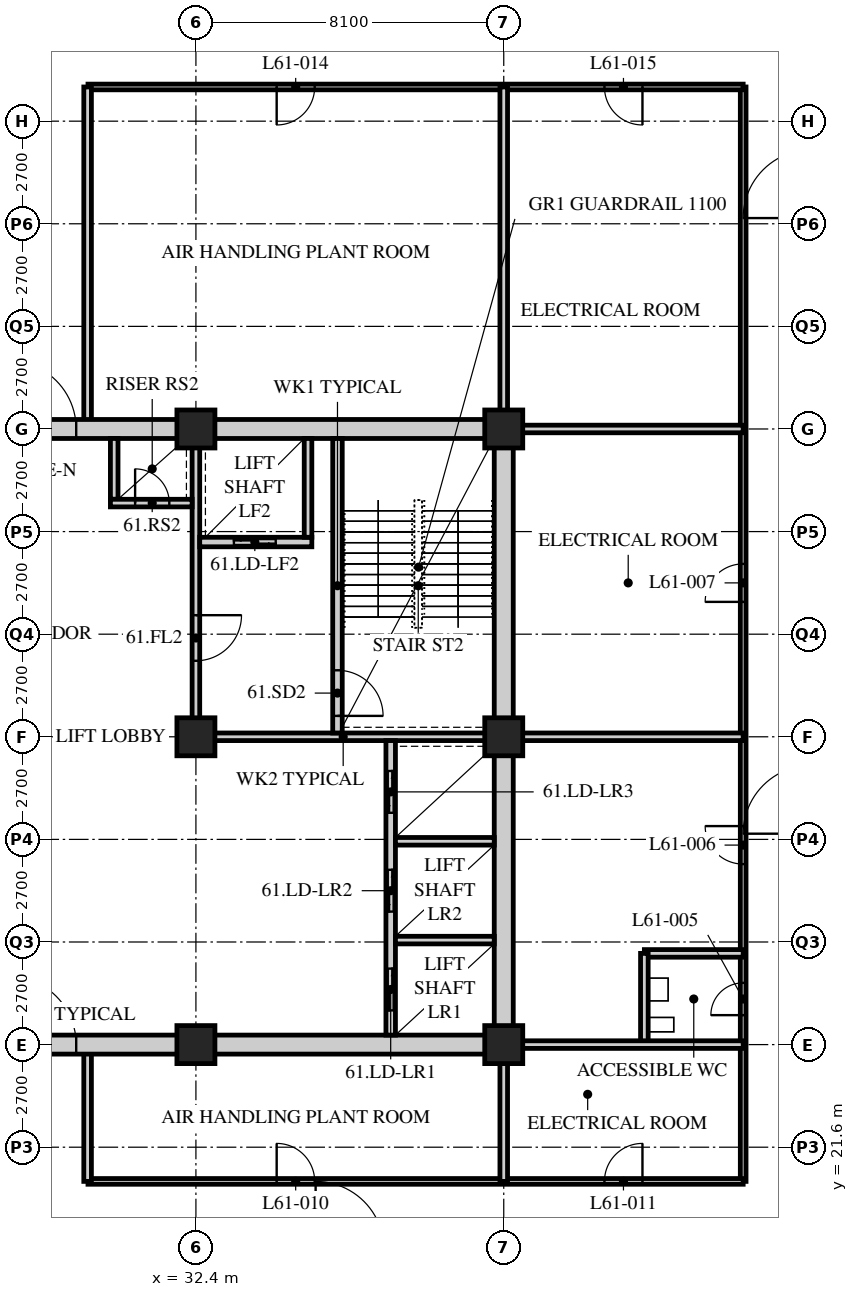
"""IFC4 building model, lengths in metres.
Left out: names, types, materials, properties, quantities, classifications, styles, units other than length and angle.
Written with IfcOpenShell. Run it as: python <this file> out.ifc"""

import sys

from ifc_helpers import new_model, si_unit, direction, frame, frame_2d, origin, origin_2d, place, context, subcontext, project, spatial, rectangle, hollow_rectangle, extrude, element, fill, save


model = new_model("IFC4")
c1 = context("Model", 3, precision=1e-05, world=origin(), true_north=direction((0.0, 1.0)))
c2 = subcontext(c1, "Body", "Model", "MODEL_VIEW")
j1 = project(units=[si_unit("LENGTHUNIT", "METRE"), si_unit("PLANEANGLEUNIT", "RADIAN")], contexts=[c1])
p1 = place(None, origin())
s1 = spatial("IfcSite", under=j1, at=p1, CompositionType="ELEMENT")
p2 = place(p1, origin())
s2 = spatial("IfcBuilding", under=s1, at=p2, CompositionType="ELEMENT")
p3 = place(p2, frame((0.0, 0.0, 235.2)))
s3 = spatial("IfcBuildingStorey", under=s2, at=p3, CompositionType="ELEMENT", Elevation=235.2)
for number, where, z_axis, x_axis in (
    (1, (32.4, 24.3, 0.0), (0.0, 0.0, 1.0), (1.0, 0.0, 0.0)),
    (2, (32.4, 32.4, 0.0), (0.0, 0.0, 1.0), (1.0, 0.0, 0.0)),
    (3, (32.4, 40.5, 0.0), (0.0, 0.0, 1.0), (1.0, 0.0, 0.0)),
    (4, (40.5, 24.3, 0.0), (0.0, 0.0, 1.0), (1.0, 0.0, 0.0)),
    (5, (40.5, 32.4, 0.0), (0.0, 0.0, 1.0), (1.0, 0.0, 0.0)),
    (6, (40.5, 40.5, 0.0), (0.0, 0.0, 1.0), (1.0, 0.0, 0.0)),
):
    element("IfcColumn", number, at=place(p3, frame(where, z_axis=z_axis, x_axis=x_axis)), inside=s3, PredefinedType="COLUMN", context=c2, shape_type="SweptSolid", body=[
        extrude(hollow_rectangle(XDim=1.0, YDim=1.0, WallThickness=0.1, at=origin_2d()), origin(), (0.0, 0.0, 1.0), 7.2),
    ])
p4 = place(p3, frame((46.8, 20.7, 0.0), z_axis=(0.0, 0.0, 1.0), x_axis=(0.0, 1.0, 0.0)))
e7 = element("IfcWall", 7, at=p4, inside=s3, PredefinedType="PARTITIONING", context=c2, shape_type="SweptSolid", body=[
    extrude(rectangle(XDim=28.8, YDim=0.15, at=frame_2d((14.4, 0.0))), origin(), (0.0, 0.0, 1.0), 6.95),
])
p5 = place(p4, frame((4.375, 0.0, 0.0)))
e8 = element("IfcOpeningElement", 8, at=p5, cuts=e7, PredefinedType="OPENING", context=c2, shape_type="SweptSolid", body=[
    extrude(rectangle(XDim=0.85, YDim=2.1, at=frame_2d((0.425, 1.05))), frame((0.0, 0.085, 0.0), z_axis=(0.0, -1.0, 0.0), x_axis=(1.0, 0.0, 0.0)), (0.0, 0.0, 1.0), 0.17),
])
p6 = place(p4, frame((8.35, 0.0, 0.0)))
e9 = element("IfcOpeningElement", 9, at=p6, cuts=e7, PredefinedType="OPENING", context=c2, shape_type="SweptSolid", body=[
    extrude(rectangle(XDim=1.0, YDim=2.1, at=frame_2d((0.5, 1.05))), frame((0.0, 0.085, 0.0), z_axis=(0.0, -1.0, 0.0), x_axis=(1.0, 0.0, 0.0)), (0.0, 0.0, 1.0), 0.17),
])
p7 = place(p4, frame((15.25, 0.0, 0.0)))
e10 = element("IfcOpeningElement", 10, at=p7, cuts=e7, PredefinedType="OPENING", context=c2, shape_type="SweptSolid", body=[
    extrude(rectangle(XDim=1.0, YDim=2.1, at=frame_2d((0.5, 1.05))), frame((0.0, 0.085, 0.0), z_axis=(0.0, -1.0, 0.0), x_axis=(1.0, 0.0, 0.0)), (0.0, 0.0, 1.0), 0.17),
])
p8 = place(p3, frame((46.8, 49.5, 0.0), z_axis=(0.0, 0.0, 1.0), x_axis=(-1.0, 0.0, 0.0)))
e11 = element("IfcWall", 11, at=p8, inside=s3, PredefinedType="PARTITIONING", context=c2, shape_type="SweptSolid", body=[
    extrude(rectangle(XDim=17.24, YDim=0.15, at=frame_2d((8.62, 0.0))), origin(), (0.0, 0.0, 1.0), 6.95),
])
p9 = place(p8, frame((11.275, 0.0, 0.0)))
e12 = element("IfcOpeningElement", 12, at=p9, cuts=e11, PredefinedType="OPENING", context=c2, shape_type="SweptSolid", body=[
    extrude(rectangle(XDim=1.0, YDim=2.1, at=frame_2d((0.5, 1.05))), frame((0.0, 0.085, 0.0), z_axis=(0.0, -1.0, 0.0), x_axis=(1.0, 0.0, 0.0)), (0.0, 0.0, 1.0), 0.17),
])
p10 = place(p8, frame((2.65, 0.0, 0.0)))
e13 = element("IfcOpeningElement", 13, at=p10, cuts=e11, PredefinedType="OPENING", context=c2, shape_type="SweptSolid", body=[
    extrude(rectangle(XDim=1.0, YDim=2.1, at=frame_2d((0.5, 1.05))), frame((0.0, 0.085, 0.0), z_axis=(0.0, -1.0, 0.0), x_axis=(1.0, 0.0, 0.0)), (0.0, 0.0, 1.0), 0.17),
])
p11 = place(p3, frame((29.56, 20.7, 0.0), z_axis=(0.0, 0.0, 1.0), x_axis=(1.0, 0.0, 0.0)))
e14 = element("IfcWall", 14, at=p11, inside=s3, PredefinedType="PARTITIONING", context=c2, shape_type="SweptSolid", body=[
    extrude(rectangle(XDim=17.24, YDim=0.15, at=frame_2d((8.62, 0.0))), origin(), (0.0, 0.0, 1.0), 6.95),
])
p12 = place(p11, frame((4.965, 0.0, 0.0)))
e15 = element("IfcOpeningElement", 15, at=p12, cuts=e14, PredefinedType="OPENING", context=c2, shape_type="SweptSolid", body=[
    extrude(rectangle(XDim=1.0, YDim=2.1, at=frame_2d((0.5, 1.05))), frame((0.0, 0.085, 0.0), z_axis=(0.0, -1.0, 0.0), x_axis=(1.0, 0.0, 0.0)), (0.0, 0.0, 1.0), 0.17),
])
p13 = place(p11, frame((13.59, 0.0, 0.0)))
e16 = element("IfcOpeningElement", 16, at=p13, cuts=e14, PredefinedType="OPENING", context=c2, shape_type="SweptSolid", body=[
    extrude(rectangle(XDim=1.0, YDim=2.1, at=frame_2d((0.5, 1.05))), frame((0.0, 0.085, 0.0), z_axis=(0.0, -1.0, 0.0), x_axis=(1.0, 0.0, 0.0)), (0.0, 0.0, 1.0), 0.17),
])
p14 = place(p3, frame((40.5, 32.4, 0.0), z_axis=(0.0, 0.0, 1.0), x_axis=(1.0, 0.0, 0.0)))
e17 = element("IfcWall", 17, at=p14, inside=s3, PredefinedType="SOLIDWALL", context=c2, shape_type="SweptSolid", body=[
    extrude(rectangle(XDim=6.3, YDim=0.2, at=frame_2d((3.15, 0.0))), origin(), (0.0, 0.0, 1.0), 6.25),
])
p15 = place(p3, frame((46.8, 26.7, 0.0), z_axis=(0.0, 0.0, 1.0), x_axis=(-1.0, 0.0, 0.0)))
e18 = element("IfcWall", 18, at=p15, inside=s3, PredefinedType="SOLIDWALL", context=c2, shape_type="SweptSolid", body=[
    extrude(rectangle(XDim=2.6, YDim=0.2, at=frame_2d((1.3, 0.0))), origin(), (0.0, 0.0, 1.0), 6.95),
])
p16 = place(p3, frame((44.2, 24.3, 0.0), z_axis=(0.0, 0.0, 1.0), x_axis=(0.0, 1.0, 0.0)))
e19 = element("IfcWall", 19, at=p16, inside=s3, PredefinedType="SOLIDWALL", context=c2, shape_type="SweptSolid", body=[
    extrude(rectangle(XDim=2.4, YDim=0.2, at=frame_2d((1.2, 0.0))), origin(), (0.0, 0.0, 1.0), 6.95),
])
p17 = place(p3, frame((40.5, 20.7, 0.0), z_axis=(0.0, 0.0, 1.0), x_axis=(0.0, 1.0, 0.0)))
e20 = element("IfcWall", 20, at=p17, inside=s3, PredefinedType="SOLIDWALL", context=c2, shape_type="SweptSolid", body=[
    extrude(rectangle(XDim=3.6, YDim=0.2, at=frame_2d((1.8, 0.0))), origin(), (0.0, 0.0, 1.0), 5.95),
])
p18 = place(p3, frame((29.55, 20.7, 0.0), z_axis=(0.0, 0.0, 1.0), x_axis=(0.0, 1.0, 0.0)))
e21 = element("IfcWall", 21, at=p18, inside=s3, PredefinedType="SOLIDWALL", context=c2, shape_type="SweptSolid", body=[
    extrude(rectangle(XDim=3.6, YDim=0.2, at=frame_2d((1.8, 0.0))), origin(), (0.0, 0.0, 1.0), 6.95),
])
p19 = place(p3, frame((40.5, 40.5, 0.0), z_axis=(0.0, 0.0, 1.0), x_axis=(0.0, 1.0, 0.0)))
e22 = element("IfcWall", 22, at=p19, inside=s3, PredefinedType="SOLIDWALL", context=c2, shape_type="SweptSolid", body=[
    extrude(rectangle(XDim=9.0, YDim=0.2, at=frame_2d((4.5, 0.0))), origin(), (0.0, 0.0, 1.0), 5.95),
])
p20 = place(p3, frame((29.55, 40.5, 0.0), z_axis=(0.0, 0.0, 1.0), x_axis=(0.0, 1.0, 0.0)))
e23 = element("IfcWall", 23, at=p20, inside=s3, PredefinedType="SOLIDWALL", context=c2, shape_type="SweptSolid", body=[
    extrude(rectangle(XDim=9.0, YDim=0.2, at=frame_2d((4.5, 0.0))), origin(), (0.0, 0.0, 1.0), 6.95),
])
for number, where, z_axis, x_axis in (
    (24, (40.5, 24.3, 0.0), (0.0, 0.0, 1.0), (1.0, 0.0, 0.0)),
    (25, (40.5, 40.5, 0.0), (0.0, 0.0, 1.0), (1.0, 0.0, 0.0)),
):
    element("IfcWall", number, at=place(p3, frame(where, z_axis=z_axis, x_axis=x_axis)), inside=s3, PredefinedType="SOLIDWALL", context=c2, shape_type="SweptSolid", body=[
        extrude(rectangle(XDim=6.3, YDim=0.2, at=frame_2d((3.15, 0.0))), origin(), (0.0, 0.0, 1.0), 6.25),
    ])
p21 = place(p3, frame((15.95, 24.3, 0.0), z_axis=(0.0, 0.0, 1.0), x_axis=(1.0, 0.0, 0.0)))
e26 = element("IfcWall", 26, at=p21, inside=s3, PredefinedType="SOLIDWALL", context=c2, shape_type="SweptSolid", body=[
    extrude(rectangle(XDim=24.8, YDim=0.5, at=frame_2d((12.4, 0.0))), origin(), (0.0, 0.0, 1.0), 6.188),
])
p22 = place(p21, frame((11.5, 0.0, 0.0)))
e27 = element("IfcOpeningElement", 27, at=p22, cuts=e26, PredefinedType="OPENING", context=c2, shape_type="SweptSolid", body=[
    extrude(rectangle(XDim=1.8, YDim=2.4, at=frame_2d((0.9, 1.2))), frame((0.0, 0.26, 0.0), z_axis=(0.0, -1.0, 0.0), x_axis=(1.0, 0.0, 0.0)), (0.0, 0.0, 1.0), 0.52),
])
p23 = place(p3, frame((15.95, 40.5, 0.0), z_axis=(0.0, 0.0, 1.0), x_axis=(1.0, 0.0, 0.0)))
e28 = element("IfcWall", 28, at=p23, inside=s3, PredefinedType="SOLIDWALL", context=c2, shape_type="SweptSolid", body=[
    extrude(rectangle(XDim=24.8, YDim=0.5, at=frame_2d((12.4, 0.0))), origin(), (0.0, 0.0, 1.0), 6.188),
])
p24 = place(p23, frame((11.5, 0.0, 0.0)))
e29 = element("IfcOpeningElement", 29, at=p24, cuts=e28, PredefinedType="OPENING", context=c2, shape_type="SweptSolid", body=[
    extrude(rectangle(XDim=1.8, YDim=2.4, at=frame_2d((0.9, 1.2))), frame((0.0, 0.26, 0.0), z_axis=(0.0, -1.0, 0.0), x_axis=(1.0, 0.0, 0.0)), (0.0, 0.0, 1.0), 0.52),
])
p25 = place(p3, frame((40.5, 24.55, 0.0), z_axis=(0.0, 0.0, 1.0), x_axis=(0.0, 1.0, 0.0)))
e30 = element("IfcWall", 30, at=p25, inside=s3, PredefinedType="SOLIDWALL", context=c2, shape_type="SweptSolid", body=[
    extrude(rectangle(XDim=15.7, YDim=0.5, at=frame_2d((7.85, 0.0))), origin(), (0.0, 0.0, 1.0), 5.95),
])
p26 = place(p3, frame((32.3, 32.4, 0.0), z_axis=(0.0, 0.0, 1.0), x_axis=(1.0, 0.0, 0.0)))
e31 = element("IfcWall", 31, at=p26, inside=s3, PredefinedType="SOLIDWALL", context=c2, shape_type="SweptSolid", body=[
    extrude(rectangle(XDim=7.95, YDim=0.2, at=frame_2d((3.975, 0.0))), origin(), (0.0, 0.0, 1.0), 6.25),
])
p27 = place(p3, frame((32.4, 32.5, 0.0), z_axis=(0.0, 0.0, 1.0), x_axis=(0.0, 1.0, 0.0)))
e32 = element("IfcWall", 32, at=p27, inside=s3, PredefinedType="SOLIDWALL", context=c2, shape_type="SweptSolid", body=[
    extrude(rectangle(XDim=7.75, YDim=0.2, at=frame_2d((3.875, 0.0))), origin(), (0.0, 0.0, 1.0), 6.25),
])
p28 = place(p27, frame((1.9, 0.0, 0.0)))
e33 = element("IfcOpeningElement", 33, at=p28, cuts=e32, PredefinedType="OPENING", context=c2, shape_type="SweptSolid", body=[
    extrude(rectangle(XDim=1.2, YDim=2.1, at=frame_2d((0.6, 1.05))), frame((0.0, 0.11, 0.0), z_axis=(0.0, -1.0, 0.0), x_axis=(1.0, 0.0, 0.0)), (0.0, 0.0, 1.0), 0.22),
])
p29 = place(p3, frame((37.525, 24.55, 0.0), z_axis=(0.0, 0.0, 1.0), x_axis=(0.0, 1.0, 0.0)))
e34 = element("IfcWall", 34, at=p29, inside=s3, PredefinedType="SOLIDWALL", context=c2, shape_type="SweptSolid", body=[
    extrude(rectangle(XDim=7.75, YDim=0.25, at=frame_2d((3.875, 0.0))), origin(), (0.0, 0.0, 1.0), 6.95),
])
p30 = place(p29, frame((0.65, 0.0, 0.0)))
e35 = element("IfcOpeningElement", 35, at=p30, cuts=e34, PredefinedType="OPENING", context=c2, shape_type="SweptSolid", body=[
    extrude(rectangle(XDim=1.1, YDim=2.4, at=frame_2d((0.55, 1.2))), frame((0.0, 0.135, 0.0), z_axis=(0.0, -1.0, 0.0), x_axis=(1.0, 0.0, 0.0)), (0.0, 0.0, 1.0), 0.27),
])
p31 = place(p29, frame((3.25, 0.0, 0.0)))
e36 = element("IfcOpeningElement", 36, at=p31, cuts=e34, PredefinedType="OPENING", context=c2, shape_type="SweptSolid", body=[
    extrude(rectangle(XDim=1.1, YDim=2.4, at=frame_2d((0.55, 1.2))), frame((0.0, 0.135, 0.0), z_axis=(0.0, -1.0, 0.0), x_axis=(1.0, 0.0, 0.0)), (0.0, 0.0, 1.0), 0.27),
])
p32 = place(p29, frame((5.85, 0.0, 0.0)))
e37 = element("IfcOpeningElement", 37, at=p32, cuts=e34, PredefinedType="OPENING", context=c2, shape_type="SweptSolid", body=[
    extrude(rectangle(XDim=1.1, YDim=2.4, at=frame_2d((0.55, 1.2))), frame((0.0, 0.135, 0.0), z_axis=(0.0, -1.0, 0.0), x_axis=(1.0, 0.0, 0.0)), (0.0, 0.0, 1.0), 0.27),
])
for number, where, z_axis, x_axis in (
    (38, (37.65, 27.05, 0.0), (0.0, 0.0, 1.0), (1.0, 0.0, 0.0)),
    (39, (37.65, 29.65, 0.0), (0.0, 0.0, 1.0), (1.0, 0.0, 0.0)),
):
    element("IfcWall", number, at=place(p3, frame(where, z_axis=z_axis, x_axis=x_axis)), inside=s3, PredefinedType="SOLIDWALL", context=c2, shape_type="SweptSolid", body=[
        extrude(rectangle(XDim=2.6, YDim=0.2, at=frame_2d((1.3, 0.0))), origin(), (0.0, 0.0, 1.0), 6.95),
    ])
p33 = place(p3, frame((36.125, 32.5, 0.0), z_axis=(0.0, 0.0, 1.0), x_axis=(0.0, 1.0, 0.0)))
e40 = element("IfcWall", 40, at=p33, inside=s3, PredefinedType="SOLIDWALL", context=c2, shape_type="SweptSolid", body=[
    extrude(rectangle(XDim=7.75, YDim=0.25, at=frame_2d((3.875, 0.0))), origin(), (0.0, 0.0, 1.0), 6.95),
])
p34 = place(p33, frame((0.45, 0.0, 0.0)))
e41 = element("IfcOpeningElement", 41, at=p34, cuts=e40, PredefinedType="OPENING", context=c2, shape_type="SweptSolid", body=[
    extrude(rectangle(XDim=1.2, YDim=2.1, at=frame_2d((0.6, 1.05))), frame((0.0, 0.135, 0.0), z_axis=(0.0, -1.0, 0.0), x_axis=(1.0, 0.0, 0.0)), (0.0, 0.0, 1.0), 0.27),
])
p35 = place(p3, frame((32.5, 37.525, 0.0), z_axis=(0.0, 0.0, 1.0), x_axis=(1.0, 0.0, 0.0)))
e42 = element("IfcWall", 42, at=p35, inside=s3, PredefinedType="SOLIDWALL", context=c2, shape_type="SweptSolid", body=[
    extrude(rectangle(XDim=2.95, YDim=0.25, at=frame_2d((1.475, 0.0))), origin(), (0.0, 0.0, 1.0), 6.95),
])
p36 = place(p35, frame((0.9, 0.0, 0.0)))
e43 = element("IfcOpeningElement", 43, at=p36, cuts=e42, PredefinedType="OPENING", context=c2, shape_type="SweptSolid", body=[
    extrude(rectangle(XDim=1.1, YDim=2.4, at=frame_2d((0.55, 1.2))), frame((0.0, 0.135, 0.0), z_axis=(0.0, -1.0, 0.0), x_axis=(1.0, 0.0, 0.0)), (0.0, 0.0, 1.0), 0.27),
])
p37 = place(p3, frame((35.35, 37.65, 0.0), z_axis=(0.0, 0.0, 1.0), x_axis=(0.0, 1.0, 0.0)))
e44 = element("IfcWall", 44, at=p37, inside=s3, PredefinedType="SOLIDWALL", context=c2, shape_type="SweptSolid", body=[
    extrude(rectangle(XDim=2.6, YDim=0.2, at=frame_2d((1.3, 0.0))), origin(), (0.0, 0.0, 1.0), 6.95),
])
p38 = place(p3, frame((30.25, 38.65, 0.0), z_axis=(0.0, 0.0, 1.0), x_axis=(0.0, 1.0, 0.0)))
e45 = element("IfcWall", 45, at=p38, inside=s3, PredefinedType="SOLIDWALL", context=c2, shape_type="SweptSolid", body=[
    extrude(rectangle(XDim=1.6, YDim=0.2, at=frame_2d((0.8, 0.0))), origin(), (0.0, 0.0, 1.0), 6.95),
])
p39 = place(p3, frame((30.15, 38.55, 0.0), z_axis=(0.0, 0.0, 1.0), x_axis=(1.0, 0.0, 0.0)))
e46 = element("IfcWall", 46, at=p39, inside=s3, PredefinedType="SOLIDWALL", context=c2, shape_type="SweptSolid", body=[
    extrude(rectangle(XDim=2.15, YDim=0.2, at=frame_2d((1.075, 0.0))), origin(), (0.0, 0.0, 1.0), 6.95),
])
p40 = place(p39, frame((0.65, 0.0, 0.0)))
e47 = element("IfcOpeningElement", 47, at=p40, cuts=e46, PredefinedType="OPENING", context=c2, shape_type="SweptSolid", body=[
    extrude(rectangle(XDim=0.9, YDim=2.1, at=frame_2d((0.45, 1.05))), frame((0.0, 0.11, 0.0), z_axis=(0.0, -1.0, 0.0), x_axis=(1.0, 0.0, 0.0)), (0.0, 0.0, 1.0), 0.22),
])
p41 = place(p5, origin())
e48 = element("IfcDoor", 48, at=p41, inside=s3, OperationType="SINGLE_SWING_LEFT", PredefinedType="DOOR", context=c2, shape_type="SweptSolid", body=[
    extrude(rectangle(XDim=0.85, YDim=2.1, at=frame_2d((0.425, 1.05))), frame((0.0, 0.025, 0.0), z_axis=(0.0, -1.0, 0.0), x_axis=(1.0, 0.0, 0.0)), (0.0, 0.0, 1.0), 0.05),
])
fill(e8, e48)
p42 = place(p6, origin())
e49 = element("IfcDoor", 49, at=p42, inside=s3, OperationType="SINGLE_SWING_RIGHT", PredefinedType="DOOR", context=c2, shape_type="SweptSolid", body=[
    extrude(rectangle(XDim=1.0, YDim=2.1, at=frame_2d((0.5, 1.05))), frame((0.0, 0.025, 0.0), z_axis=(0.0, -1.0, 0.0), x_axis=(1.0, 0.0, 0.0)), (0.0, 0.0, 1.0), 0.05),
])
fill(e9, e49)
p43 = place(p7, origin())
e50 = element("IfcDoor", 50, at=p43, inside=s3, OperationType="SINGLE_SWING_LEFT", PredefinedType="DOOR", context=c2, shape_type="SweptSolid", body=[
    extrude(rectangle(XDim=1.0, YDim=2.1, at=frame_2d((0.5, 1.05))), frame((0.0, 0.025, 0.0), z_axis=(0.0, -1.0, 0.0), x_axis=(1.0, 0.0, 0.0)), (0.0, 0.0, 1.0), 0.05),
])
fill(e10, e50)
p44 = place(p12, origin())
e51 = element("IfcDoor", 51, at=p44, inside=s3, OperationType="SINGLE_SWING_LEFT", PredefinedType="DOOR", context=c2, shape_type="SweptSolid", body=[
    extrude(rectangle(XDim=1.0, YDim=2.1, at=frame_2d((0.5, 1.05))), frame((0.0, 0.025, 0.0), z_axis=(0.0, -1.0, 0.0), x_axis=(1.0, 0.0, 0.0)), (0.0, 0.0, 1.0), 0.05),
])
fill(e15, e51)
p45 = place(p13, origin())
e52 = element("IfcDoor", 52, at=p45, inside=s3, OperationType="SINGLE_SWING_RIGHT", PredefinedType="DOOR", context=c2, shape_type="SweptSolid", body=[
    extrude(rectangle(XDim=1.0, YDim=2.1, at=frame_2d((0.5, 1.05))), frame((0.0, 0.025, 0.0), z_axis=(0.0, -1.0, 0.0), x_axis=(1.0, 0.0, 0.0)), (0.0, 0.0, 1.0), 0.05),
])
fill(e16, e52)
p46 = place(p9, origin())
e53 = element("IfcDoor", 53, at=p46, inside=s3, OperationType="SINGLE_SWING_RIGHT", PredefinedType="DOOR", context=c2, shape_type="SweptSolid", body=[
    extrude(rectangle(XDim=1.0, YDim=2.1, at=frame_2d((0.5, 1.05))), frame((0.0, 0.025, 0.0), z_axis=(0.0, -1.0, 0.0), x_axis=(1.0, 0.0, 0.0)), (0.0, 0.0, 1.0), 0.05),
])
fill(e12, e53)
p47 = place(p10, origin())
e54 = element("IfcDoor", 54, at=p47, inside=s3, OperationType="SINGLE_SWING_LEFT", PredefinedType="DOOR", context=c2, shape_type="SweptSolid", body=[
    extrude(rectangle(XDim=1.0, YDim=2.1, at=frame_2d((0.5, 1.05))), frame((0.0, 0.025, 0.0), z_axis=(0.0, -1.0, 0.0), x_axis=(1.0, 0.0, 0.0)), (0.0, 0.0, 1.0), 0.05),
])
fill(e13, e54)
p48 = place(p34, origin())
e55 = element("IfcDoor", 55, at=p48, inside=s3, OperationType="SINGLE_SWING_RIGHT", PredefinedType="DOOR", context=c2, shape_type="SweptSolid", body=[
    extrude(rectangle(XDim=1.2, YDim=2.1, at=frame_2d((0.6, 1.05))), frame((0.0, 0.025, 0.0), z_axis=(0.0, -1.0, 0.0), x_axis=(1.0, 0.0, 0.0)), (0.0, 0.0, 1.0), 0.05),
])
fill(e41, e55)
p49 = place(p28, origin())
e56 = element("IfcDoor", 56, at=p49, inside=s3, OperationType="SINGLE_SWING_LEFT", PredefinedType="DOOR", context=c2, shape_type="SweptSolid", body=[
    extrude(rectangle(XDim=1.2, YDim=2.1, at=frame_2d((0.6, 1.05))), frame((0.0, 0.025, 0.0), z_axis=(0.0, -1.0, 0.0), x_axis=(1.0, 0.0, 0.0)), (0.0, 0.0, 1.0), 0.05),
])
fill(e33, e56)
p50 = place(p40, origin())
e57 = element("IfcDoor", 57, at=p50, inside=s3, OperationType="SINGLE_SWING_LEFT", PredefinedType="DOOR", context=c2, shape_type="SweptSolid", body=[
    extrude(rectangle(XDim=0.9, YDim=2.1, at=frame_2d((0.45, 1.05))), frame((0.0, 0.025, 0.0), z_axis=(0.0, -1.0, 0.0), x_axis=(1.0, 0.0, 0.0)), (0.0, 0.0, 1.0), 0.05),
])
fill(e47, e57)
p51 = place(p30, origin())
e58 = element("IfcDoor", 58, at=p51, inside=s3, OperationType="DOUBLE_DOOR_SLIDING", PredefinedType="DOOR", context=c2, shape_type="SweptSolid", body=[
    extrude(rectangle(XDim=1.1, YDim=2.4, at=frame_2d((0.55, 1.2))), frame((0.0, 0.025, 0.0), z_axis=(0.0, -1.0, 0.0), x_axis=(1.0, 0.0, 0.0)), (0.0, 0.0, 1.0), 0.05),
])
fill(e35, e58)
p52 = place(p31, origin())
e59 = element("IfcDoor", 59, at=p52, inside=s3, OperationType="DOUBLE_DOOR_SLIDING", PredefinedType="DOOR", context=c2, shape_type="SweptSolid", body=[
    extrude(rectangle(XDim=1.1, YDim=2.4, at=frame_2d((0.55, 1.2))), frame((0.0, 0.025, 0.0), z_axis=(0.0, -1.0, 0.0), x_axis=(1.0, 0.0, 0.0)), (0.0, 0.0, 1.0), 0.05),
])
fill(e36, e59)
p53 = place(p32, origin())
e60 = element("IfcDoor", 60, at=p53, inside=s3, OperationType="DOUBLE_DOOR_SLIDING", PredefinedType="DOOR", context=c2, shape_type="SweptSolid", body=[
    extrude(rectangle(XDim=1.1, YDim=2.4, at=frame_2d((0.55, 1.2))), frame((0.0, 0.025, 0.0), z_axis=(0.0, -1.0, 0.0), x_axis=(1.0, 0.0, 0.0)), (0.0, 0.0, 1.0), 0.05),
])
fill(e37, e60)
p54 = place(p36, origin())
e61 = element("IfcDoor", 61, at=p54, inside=s3, OperationType="DOUBLE_DOOR_SLIDING", PredefinedType="DOOR", context=c2, shape_type="SweptSolid", body=[
    extrude(rectangle(XDim=1.1, YDim=2.4, at=frame_2d((0.55, 1.2))), frame((0.0, 0.025, 0.0), z_axis=(0.0, -1.0, 0.0), x_axis=(1.0, 0.0, 0.0)), (0.0, 0.0, 1.0), 0.05),
])
fill(e43, e61)
p55 = place(p22, origin())
e62 = element("IfcDoor", 62, at=p55, inside=s3, OperationType="DOUBLE_DOOR_SINGLE_SWING", PredefinedType="DOOR", context=c2, shape_type="SweptSolid", body=[
    extrude(rectangle(XDim=1.8, YDim=2.4, at=frame_2d((0.9, 1.2))), frame((0.0, 0.025, 0.0), z_axis=(0.0, -1.0, 0.0), x_axis=(1.0, 0.0, 0.0)), (0.0, 0.0, 1.0), 0.05),
])
fill(e27, e62)
p56 = place(p24, origin())
e63 = element("IfcDoor", 63, at=p56, inside=s3, OperationType="DOUBLE_DOOR_SINGLE_SWING", PredefinedType="DOOR", context=c2, shape_type="SweptSolid", body=[
    extrude(rectangle(XDim=1.8, YDim=2.4, at=frame_2d((0.9, 1.2))), frame((0.0, 0.025, 0.0), z_axis=(0.0, -1.0, 0.0), x_axis=(1.0, 0.0, 0.0)), (0.0, 0.0, 1.0), 0.05),
])
fill(e29, e63)
save(model, sys.argv[1])
